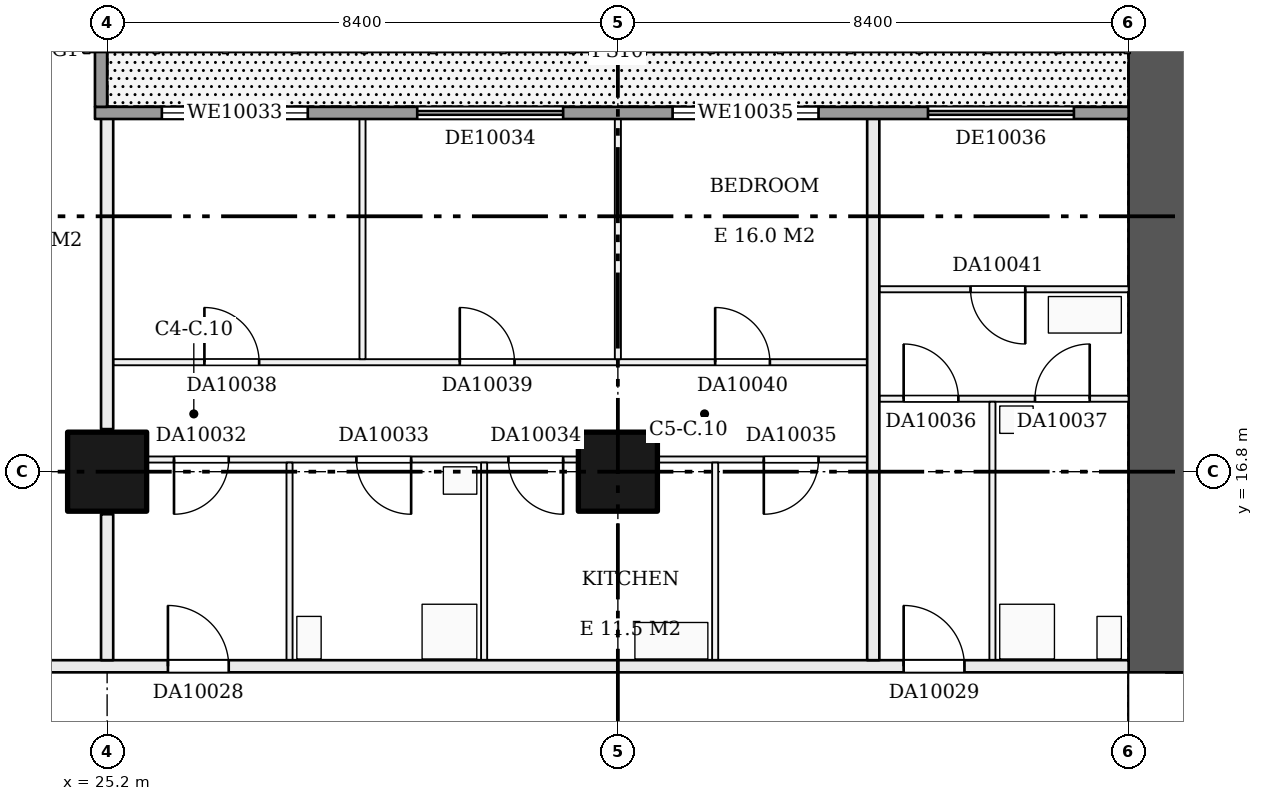
"""IFC4 building model, lengths in metres.
Left out: names, types, materials, properties, quantities, classifications, styles, units other than length and angle.
Written with IfcOpenShell. Run it as: python <this file> out.ifc"""

import sys

from ifc_helpers import new_model, si_unit, direction, frame, frame_2d, origin, origin_2d, place, context, subcontext, project, spatial, rectangle, extrude, element, fill, save


model = new_model("IFC4")
c1 = context("Model", 3, precision=1e-05, world=origin(), true_north=direction((0.0, 1.0)))
c2 = subcontext(c1, "Body", "Model", "MODEL_VIEW")
j1 = project(units=[si_unit("LENGTHUNIT", "METRE"), si_unit("PLANEANGLEUNIT", "RADIAN")], contexts=[c1])
p1 = place(None, origin())
s1 = spatial("IfcSite", under=j1, at=p1, CompositionType="ELEMENT")
p2 = place(p1, origin())
s2 = spatial("IfcBuilding", under=s1, at=p2, CompositionType="ELEMENT")
p3 = place(p2, frame((0.0, 0.0, 46.2)))
s3 = spatial("IfcBuildingStorey", under=s2, at=p3, CompositionType="ELEMENT", Elevation=46.2)
for number, where, z_axis, x_axis in (
    (1, (25.2, 16.8, 0.0), (0.0, 0.0, 1.0), (1.0, 0.0, 0.0)),
    (2, (33.6, 16.8, 0.0), (0.0, 0.0, 1.0), (1.0, 0.0, 0.0)),
):
    element("IfcColumn", number, at=place(p3, frame(where, z_axis=z_axis, x_axis=x_axis)), inside=s3, PredefinedType="COLUMN", context=c2, shape_type="SweptSolid", body=[
        extrude(rectangle(XDim=1.3, YDim=1.3, at=origin_2d()), origin(), (0.0, 0.0, 1.0), 3.22),
    ])
p4 = place(p3, frame((42.6, 9.6, 0.0), z_axis=(0.0, 0.0, 1.0), x_axis=(0.0, 1.0, 0.0)))
e3 = element("IfcWall", 3, at=p4, inside=s3, PredefinedType="SHEAR", context=c2, shape_type="SweptSolid", body=[
    extrude(rectangle(XDim=14.4, YDim=1.2, at=frame_2d((7.2, 0.0))), origin(), (0.0, 0.0, 1.0), 3.22),
])
p5 = place(p4, frame((2.1, 0.0, 0.0)))
e4 = element("IfcOpeningElement", 4, at=p5, cuts=e3, PredefinedType="OPENING", context=c2, shape_type="SweptSolid", body=[
    extrude(rectangle(XDim=1.8, YDim=2.1, at=frame_2d((0.9, 1.05))), frame((0.0, 0.61, 0.0), z_axis=(0.0, -1.0, 0.0), x_axis=(1.0, 0.0, 0.0)), (0.0, 0.0, 1.0), 1.22),
])
p6 = place(p3, frame((16.9, 13.6, 0.0), z_axis=(0.0, 0.0, 1.0), x_axis=(1.0, 0.0, 0.0)))
e5 = element("IfcWall", 5, at=p6, inside=s3, PredefinedType="PARTITIONING", context=c2, shape_type="SweptSolid", body=[
    extrude(rectangle(XDim=25.1, YDim=0.2, at=frame_2d((12.55, 0.0))), origin(), (0.0, 0.0, 1.0), 3.22),
])
p7 = place(p6, frame((9.3, 0.0, 0.0)))
e6 = element("IfcOpeningElement", 6, at=p7, cuts=e5, PredefinedType="OPENING", context=c2, shape_type="SweptSolid", body=[
    extrude(rectangle(XDim=1.0, YDim=2.1, at=frame_2d((0.5, 1.05))), frame((0.0, 0.11, 0.0), z_axis=(0.0, -1.0, 0.0), x_axis=(1.0, 0.0, 0.0)), (0.0, 0.0, 1.0), 0.22),
])
p8 = place(p6, frame((21.4, 0.0, 0.0)))
e7 = element("IfcOpeningElement", 7, at=p8, cuts=e5, PredefinedType="OPENING", context=c2, shape_type="SweptSolid", body=[
    extrude(rectangle(XDim=1.0, YDim=2.1, at=frame_2d((0.5, 1.05))), frame((0.0, 0.11, 0.0), z_axis=(0.0, -1.0, 0.0), x_axis=(1.0, 0.0, 0.0)), (0.0, 0.0, 1.0), 0.22),
])
p9 = place(p6, frame((5.2, 0.0, 0.0)))
e8 = element("IfcOpeningElement", 8, at=p9, cuts=e5, PredefinedType="OPENING", context=c2, shape_type="SweptSolid", body=[
    extrude(rectangle(XDim=1.0, YDim=2.1, at=frame_2d((0.5, 1.05))), frame((0.0, 0.11, 0.0), z_axis=(0.0, -1.0, 0.0), x_axis=(1.0, 0.0, 0.0)), (0.0, 0.0, 1.0), 0.22),
])
p10 = place(p3, frame((25.3, 17.0, 0.0), z_axis=(0.0, 0.0, 1.0), x_axis=(1.0, 0.0, 0.0)))
e9 = element("IfcWall", 9, at=p10, inside=s3, PredefinedType="PARTITIONING", context=c2, shape_type="SweptSolid", body=[
    extrude(rectangle(XDim=12.4, YDim=0.1, at=frame_2d((6.2, 0.0))), origin(), (0.0, 0.0, 1.0), 3.22),
])
p11 = place(p10, frame((1.0, 0.0, 0.0)))
e10 = element("IfcOpeningElement", 10, at=p11, cuts=e9, PredefinedType="OPENING", context=c2, shape_type="SweptSolid", body=[
    extrude(rectangle(XDim=0.9, YDim=2.1, at=frame_2d((0.45, 1.05))), frame((0.0, 0.06, 0.0), z_axis=(0.0, -1.0, 0.0), x_axis=(1.0, 0.0, 0.0)), (0.0, 0.0, 1.0), 0.12),
])
p12 = place(p10, frame((4.0, 0.0, 0.0)))
e11 = element("IfcOpeningElement", 11, at=p12, cuts=e9, PredefinedType="OPENING", context=c2, shape_type="SweptSolid", body=[
    extrude(rectangle(XDim=0.9, YDim=2.1, at=frame_2d((0.45, 1.05))), frame((0.0, 0.06, 0.0), z_axis=(0.0, -1.0, 0.0), x_axis=(1.0, 0.0, 0.0)), (0.0, 0.0, 1.0), 0.12),
])
p13 = place(p10, frame((6.5, 0.0, 0.0)))
e12 = element("IfcOpeningElement", 12, at=p13, cuts=e9, PredefinedType="OPENING", context=c2, shape_type="SweptSolid", body=[
    extrude(rectangle(XDim=0.9, YDim=2.1, at=frame_2d((0.45, 1.05))), frame((0.0, 0.06, 0.0), z_axis=(0.0, -1.0, 0.0), x_axis=(1.0, 0.0, 0.0)), (0.0, 0.0, 1.0), 0.12),
])
p14 = place(p10, frame((10.7, 0.0, 0.0)))
e13 = element("IfcOpeningElement", 13, at=p14, cuts=e9, PredefinedType="OPENING", context=c2, shape_type="SweptSolid", body=[
    extrude(rectangle(XDim=0.9, YDim=2.1, at=frame_2d((0.45, 1.05))), frame((0.0, 0.06, 0.0), z_axis=(0.0, -1.0, 0.0), x_axis=(1.0, 0.0, 0.0)), (0.0, 0.0, 1.0), 0.12),
])
p15 = place(p3, frame((37.9, 18.0, 0.0), z_axis=(0.0, 0.0, 1.0), x_axis=(1.0, 0.0, 0.0)))
e14 = element("IfcWall", 14, at=p15, inside=s3, PredefinedType="PARTITIONING", context=c2, shape_type="SweptSolid", body=[
    extrude(rectangle(XDim=4.1, YDim=0.1, at=frame_2d((2.05, 0.0))), origin(), (0.0, 0.0, 1.0), 3.22),
])
p16 = place(p15, frame((0.4, 0.0, 0.0)))
e15 = element("IfcOpeningElement", 15, at=p16, cuts=e14, PredefinedType="OPENING", context=c2, shape_type="SweptSolid", body=[
    extrude(rectangle(XDim=0.9, YDim=2.1, at=frame_2d((0.45, 1.05))), frame((0.0, 0.06, 0.0), z_axis=(0.0, -1.0, 0.0), x_axis=(1.0, 0.0, 0.0)), (0.0, 0.0, 1.0), 0.12),
])
p17 = place(p15, frame((2.56, 0.0, 0.0)))
e16 = element("IfcOpeningElement", 16, at=p17, cuts=e14, PredefinedType="OPENING", context=c2, shape_type="SweptSolid", body=[
    extrude(rectangle(XDim=0.9, YDim=2.1, at=frame_2d((0.45, 1.05))), frame((0.0, 0.06, 0.0), z_axis=(0.0, -1.0, 0.0), x_axis=(1.0, 0.0, 0.0)), (0.0, 0.0, 1.0), 0.12),
])
p18 = place(p3, frame((25.3, 18.6, 0.0), z_axis=(0.0, 0.0, 1.0), x_axis=(1.0, 0.0, 0.0)))
e17 = element("IfcWall", 17, at=p18, inside=s3, PredefinedType="PARTITIONING", context=c2, shape_type="SweptSolid", body=[
    extrude(rectangle(XDim=12.4, YDim=0.1, at=frame_2d((6.2, 0.0))), origin(), (0.0, 0.0, 1.0), 3.22),
])
p19 = place(p18, frame((1.5, 0.0, 0.0)))
e18 = element("IfcOpeningElement", 18, at=p19, cuts=e17, PredefinedType="OPENING", context=c2, shape_type="SweptSolid", body=[
    extrude(rectangle(XDim=0.9, YDim=2.1, at=frame_2d((0.45, 1.05))), frame((0.0, 0.06, 0.0), z_axis=(0.0, -1.0, 0.0), x_axis=(1.0, 0.0, 0.0)), (0.0, 0.0, 1.0), 0.12),
])
p20 = place(p18, frame((5.7, 0.0, 0.0)))
e19 = element("IfcOpeningElement", 19, at=p20, cuts=e17, PredefinedType="OPENING", context=c2, shape_type="SweptSolid", body=[
    extrude(rectangle(XDim=0.9, YDim=2.1, at=frame_2d((0.45, 1.05))), frame((0.0, 0.06, 0.0), z_axis=(0.0, -1.0, 0.0), x_axis=(1.0, 0.0, 0.0)), (0.0, 0.0, 1.0), 0.12),
])
p21 = place(p18, frame((9.9, 0.0, 0.0)))
e20 = element("IfcOpeningElement", 20, at=p21, cuts=e17, PredefinedType="OPENING", context=c2, shape_type="SweptSolid", body=[
    extrude(rectangle(XDim=0.9, YDim=2.1, at=frame_2d((0.45, 1.05))), frame((0.0, 0.06, 0.0), z_axis=(0.0, -1.0, 0.0), x_axis=(1.0, 0.0, 0.0)), (0.0, 0.0, 1.0), 0.12),
])
p22 = place(p3, frame((37.9, 19.8, 0.0), z_axis=(0.0, 0.0, 1.0), x_axis=(1.0, 0.0, 0.0)))
e21 = element("IfcWall", 21, at=p22, inside=s3, PredefinedType="PARTITIONING", context=c2, shape_type="SweptSolid", body=[
    extrude(rectangle(XDim=4.1, YDim=0.1, at=frame_2d((2.05, 0.0))), origin(), (0.0, 0.0, 1.0), 3.22),
])
p23 = place(p22, frame((1.5, 0.0, 0.0)))
e22 = element("IfcOpeningElement", 22, at=p23, cuts=e21, PredefinedType="OPENING", context=c2, shape_type="SweptSolid", body=[
    extrude(rectangle(XDim=0.9, YDim=2.1, at=frame_2d((0.45, 1.05))), frame((0.0, 0.06, 0.0), z_axis=(0.0, -1.0, 0.0), x_axis=(1.0, 0.0, 0.0)), (0.0, 0.0, 1.0), 0.12),
])
p24 = place(p3, frame((25.2, 13.7, 0.0), z_axis=(0.0, 0.0, 1.0), x_axis=(0.0, 1.0, 0.0)))
e23 = element("IfcWall", 23, at=p24, inside=s3, PredefinedType="PARTITIONING", context=c2, shape_type="SweptSolid", body=[
    extrude(rectangle(XDim=2.4, YDim=0.2, at=frame_2d((1.2, 0.0))), origin(), (0.0, 0.0, 1.0), 3.22),
])
p25 = place(p3, frame((25.2, 17.5, 0.0), z_axis=(0.0, 0.0, 1.0), x_axis=(0.0, 1.0, 0.0)))
e24 = element("IfcWall", 24, at=p25, inside=s3, PredefinedType="PARTITIONING", context=c2, shape_type="SweptSolid", body=[
    extrude(rectangle(XDim=5.2, YDim=0.2, at=frame_2d((2.6, 0.0))), origin(), (0.0, 0.0, 1.0), 3.22),
])
p26 = place(p3, frame((28.2, 13.7, 0.0), z_axis=(0.0, 0.0, 1.0), x_axis=(0.0, 1.0, 0.0)))
e25 = element("IfcWall", 25, at=p26, inside=s3, PredefinedType="PARTITIONING", context=c2, shape_type="SweptSolid", body=[
    extrude(rectangle(XDim=3.25, YDim=0.1, at=frame_2d((1.625, 0.0))), origin(), (0.0, 0.0, 1.0), 3.22),
])
p27 = place(p3, frame((29.4, 18.65, 0.0), z_axis=(0.0, 0.0, 1.0), x_axis=(0.0, 1.0, 0.0)))
e26 = element("IfcWall", 26, at=p27, inside=s3, PredefinedType="PARTITIONING", context=c2, shape_type="SweptSolid", body=[
    extrude(rectangle(XDim=4.05, YDim=0.1, at=frame_2d((2.025, 0.0))), origin(), (0.0, 0.0, 1.0), 3.22),
])
p28 = place(p3, frame((31.4, 13.7, 0.0), z_axis=(0.0, 0.0, 1.0), x_axis=(0.0, 1.0, 0.0)))
e27 = element("IfcWall", 27, at=p28, inside=s3, PredefinedType="PARTITIONING", context=c2, shape_type="SweptSolid", body=[
    extrude(rectangle(XDim=3.25, YDim=0.1, at=frame_2d((1.625, 0.0))), origin(), (0.0, 0.0, 1.0), 3.22),
])
p29 = place(p3, frame((33.6, 18.65, 0.0), z_axis=(0.0, 0.0, 1.0), x_axis=(0.0, 1.0, 0.0)))
e28 = element("IfcWall", 28, at=p29, inside=s3, PredefinedType="PARTITIONING", context=c2, shape_type="SweptSolid", body=[
    extrude(rectangle(XDim=4.05, YDim=0.1, at=frame_2d((2.025, 0.0))), origin(), (0.0, 0.0, 1.0), 3.22),
])
p30 = place(p3, frame((35.2, 13.7, 0.0), z_axis=(0.0, 0.0, 1.0), x_axis=(0.0, 1.0, 0.0)))
e29 = element("IfcWall", 29, at=p30, inside=s3, PredefinedType="PARTITIONING", context=c2, shape_type="SweptSolid", body=[
    extrude(rectangle(XDim=3.25, YDim=0.1, at=frame_2d((1.625, 0.0))), origin(), (0.0, 0.0, 1.0), 3.22),
])
p31 = place(p3, frame((37.8, 13.7, 0.0), z_axis=(0.0, 0.0, 1.0), x_axis=(0.0, 1.0, 0.0)))
e30 = element("IfcWall", 30, at=p31, inside=s3, PredefinedType="PARTITIONING", context=c2, shape_type="SweptSolid", body=[
    extrude(rectangle(XDim=9.0, YDim=0.2, at=frame_2d((4.5, 0.0))), origin(), (0.0, 0.0, 1.0), 3.22),
])
p32 = place(p3, frame((39.76, 13.7, 0.0), z_axis=(0.0, 0.0, 1.0), x_axis=(0.0, 1.0, 0.0)))
e31 = element("IfcWall", 31, at=p32, inside=s3, PredefinedType="PARTITIONING", context=c2, shape_type="SweptSolid", body=[
    extrude(rectangle(XDim=4.25, YDim=0.1, at=frame_2d((2.125, 0.0))), origin(), (0.0, 0.0, 1.0), 3.22),
])
p33 = place(p3, frame((42.0, 22.7, 0.0), z_axis=(0.0, 0.0, 1.0), x_axis=(-1.0, 0.0, 0.0)))
e32 = element("IfcWall", 32, at=p33, inside=s3, PredefinedType="SOLIDWALL", context=c2, shape_type="SweptSolid", body=[
    extrude(rectangle(XDim=17.0, YDim=0.2, at=frame_2d((8.5, 0.0))), origin(), (0.0, 0.0, 1.0), 3.22),
])
p34 = place(p33, frame((13.5, 0.0, 0.9)))
e33 = element("IfcOpeningElement", 33, at=p34, cuts=e32, PredefinedType="OPENING", context=c2, shape_type="SweptSolid", body=[
    extrude(rectangle(XDim=2.4, YDim=1.5, at=frame_2d((1.2, 0.75))), frame((0.0, 0.11, 0.0), z_axis=(0.0, -1.0, 0.0), x_axis=(1.0, 0.0, 0.0)), (0.0, 0.0, 1.0), 0.22),
])
p35 = place(p33, frame((9.3, 0.0, 0.0)))
e34 = element("IfcOpeningElement", 34, at=p35, cuts=e32, PredefinedType="OPENING", context=c2, shape_type="SweptSolid", body=[
    extrude(rectangle(XDim=2.4, YDim=2.2, at=frame_2d((1.2, 1.1))), frame((0.0, 0.11, 0.0), z_axis=(0.0, -1.0, 0.0), x_axis=(1.0, 0.0, 0.0)), (0.0, 0.0, 1.0), 0.22),
])
p36 = place(p33, frame((5.1, 0.0, 0.9)))
e35 = element("IfcOpeningElement", 35, at=p36, cuts=e32, PredefinedType="OPENING", context=c2, shape_type="SweptSolid", body=[
    extrude(rectangle(XDim=2.4, YDim=1.5, at=frame_2d((1.2, 0.75))), frame((0.0, 0.11, 0.0), z_axis=(0.0, -1.0, 0.0), x_axis=(1.0, 0.0, 0.0)), (0.0, 0.0, 1.0), 0.22),
])
p37 = place(p33, frame((0.9, 0.0, 0.0)))
e36 = element("IfcOpeningElement", 36, at=p37, cuts=e32, PredefinedType="OPENING", context=c2, shape_type="SweptSolid", body=[
    extrude(rectangle(XDim=2.4, YDim=2.2, at=frame_2d((1.2, 1.1))), frame((0.0, 0.11, 0.0), z_axis=(0.0, -1.0, 0.0), x_axis=(1.0, 0.0, 0.0)), (0.0, 0.0, 1.0), 0.22),
])
p38 = place(p3, frame((25.1, 22.8, 0.0), z_axis=(0.0, 0.0, 1.0), x_axis=(0.0, 1.0, 0.0)))
e37 = element("IfcWall", 37, at=p38, inside=s3, PredefinedType="SOLIDWALL", context=c2, shape_type="SweptSolid", body=[
    extrude(rectangle(XDim=1.7, YDim=0.2, at=frame_2d((0.85, 0.0))), origin(), (0.0, 0.0, 1.0), 3.22),
])
p39 = place(p5, frame((1.8, 0.0, 0.0), z_axis=(0.0, 0.0, 1.0), x_axis=(-1.0, 0.0, 0.0)))
e38 = element("IfcDoor", 38, at=p39, inside=s3, OperationType="DOUBLE_DOOR_SINGLE_SWING", PredefinedType="DOOR", context=c2, shape_type="SweptSolid", body=[
    extrude(rectangle(XDim=1.8, YDim=2.1, at=frame_2d((0.9, 1.05))), frame((0.0, 0.025, 0.0), z_axis=(0.0, -1.0, 0.0), x_axis=(1.0, 0.0, 0.0)), (0.0, 0.0, 1.0), 0.05),
])
fill(e4, e38)
p40 = place(p7, origin())
e39 = element("IfcDoor", 39, at=p40, inside=s3, OperationType="SINGLE_SWING_LEFT", PredefinedType="DOOR", context=c2, shape_type="SweptSolid", body=[
    extrude(rectangle(XDim=1.0, YDim=2.1, at=frame_2d((0.5, 1.05))), frame((0.0, 0.025, 0.0), z_axis=(0.0, -1.0, 0.0), x_axis=(1.0, 0.0, 0.0)), (0.0, 0.0, 1.0), 0.05),
])
fill(e6, e39)
p41 = place(p8, origin())
e40 = element("IfcDoor", 40, at=p41, inside=s3, OperationType="SINGLE_SWING_LEFT", PredefinedType="DOOR", context=c2, shape_type="SweptSolid", body=[
    extrude(rectangle(XDim=1.0, YDim=2.1, at=frame_2d((0.5, 1.05))), frame((0.0, 0.025, 0.0), z_axis=(0.0, -1.0, 0.0), x_axis=(1.0, 0.0, 0.0)), (0.0, 0.0, 1.0), 0.05),
])
fill(e7, e40)
p42 = place(p11, frame((0.9, 0.0, 0.0), z_axis=(0.0, 0.0, 1.0), x_axis=(-1.0, 0.0, 0.0)))
e41 = element("IfcDoor", 41, at=p42, inside=s3, OperationType="SINGLE_SWING_RIGHT", PredefinedType="DOOR", context=c2, shape_type="SweptSolid", body=[
    extrude(rectangle(XDim=0.9, YDim=2.1, at=frame_2d((0.45, 1.05))), frame((0.0, 0.025, 0.0), z_axis=(0.0, -1.0, 0.0), x_axis=(1.0, 0.0, 0.0)), (0.0, 0.0, 1.0), 0.05),
])
fill(e10, e41)
p43 = place(p12, frame((0.9, 0.0, 0.0), z_axis=(0.0, 0.0, 1.0), x_axis=(-1.0, 0.0, 0.0)))
e42 = element("IfcDoor", 42, at=p43, inside=s3, OperationType="SINGLE_SWING_LEFT", PredefinedType="DOOR", context=c2, shape_type="SweptSolid", body=[
    extrude(rectangle(XDim=0.9, YDim=2.1, at=frame_2d((0.45, 1.05))), frame((0.0, 0.025, 0.0), z_axis=(0.0, -1.0, 0.0), x_axis=(1.0, 0.0, 0.0)), (0.0, 0.0, 1.0), 0.05),
])
fill(e11, e42)
p44 = place(p13, frame((0.9, 0.0, 0.0), z_axis=(0.0, 0.0, 1.0), x_axis=(-1.0, 0.0, 0.0)))
e43 = element("IfcDoor", 43, at=p44, inside=s3, OperationType="SINGLE_SWING_LEFT", PredefinedType="DOOR", context=c2, shape_type="SweptSolid", body=[
    extrude(rectangle(XDim=0.9, YDim=2.1, at=frame_2d((0.45, 1.05))), frame((0.0, 0.025, 0.0), z_axis=(0.0, -1.0, 0.0), x_axis=(1.0, 0.0, 0.0)), (0.0, 0.0, 1.0), 0.05),
])
fill(e12, e43)
p45 = place(p14, frame((0.9, 0.0, 0.0), z_axis=(0.0, 0.0, 1.0), x_axis=(-1.0, 0.0, 0.0)))
e44 = element("IfcDoor", 44, at=p45, inside=s3, OperationType="SINGLE_SWING_RIGHT", PredefinedType="DOOR", context=c2, shape_type="SweptSolid", body=[
    extrude(rectangle(XDim=0.9, YDim=2.1, at=frame_2d((0.45, 1.05))), frame((0.0, 0.025, 0.0), z_axis=(0.0, -1.0, 0.0), x_axis=(1.0, 0.0, 0.0)), (0.0, 0.0, 1.0), 0.05),
])
fill(e13, e44)
p46 = place(p16, origin())
e45 = element("IfcDoor", 45, at=p46, inside=s3, OperationType="SINGLE_SWING_LEFT", PredefinedType="DOOR", context=c2, shape_type="SweptSolid", body=[
    extrude(rectangle(XDim=0.9, YDim=2.1, at=frame_2d((0.45, 1.05))), frame((0.0, 0.025, 0.0), z_axis=(0.0, -1.0, 0.0), x_axis=(1.0, 0.0, 0.0)), (0.0, 0.0, 1.0), 0.05),
])
fill(e15, e45)
p47 = place(p17, origin())
e46 = element("IfcDoor", 46, at=p47, inside=s3, OperationType="SINGLE_SWING_RIGHT", PredefinedType="DOOR", context=c2, shape_type="SweptSolid", body=[
    extrude(rectangle(XDim=0.9, YDim=2.1, at=frame_2d((0.45, 1.05))), frame((0.0, 0.025, 0.0), z_axis=(0.0, -1.0, 0.0), x_axis=(1.0, 0.0, 0.0)), (0.0, 0.0, 1.0), 0.05),
])
fill(e16, e46)
p48 = place(p19, origin())
e47 = element("IfcDoor", 47, at=p48, inside=s3, OperationType="SINGLE_SWING_LEFT", PredefinedType="DOOR", context=c2, shape_type="SweptSolid", body=[
    extrude(rectangle(XDim=0.9, YDim=2.1, at=frame_2d((0.45, 1.05))), frame((0.0, 0.025, 0.0), z_axis=(0.0, -1.0, 0.0), x_axis=(1.0, 0.0, 0.0)), (0.0, 0.0, 1.0), 0.05),
])
fill(e18, e47)
p49 = place(p20, origin())
e48 = element("IfcDoor", 48, at=p49, inside=s3, OperationType="SINGLE_SWING_LEFT", PredefinedType="DOOR", context=c2, shape_type="SweptSolid", body=[
    extrude(rectangle(XDim=0.9, YDim=2.1, at=frame_2d((0.45, 1.05))), frame((0.0, 0.025, 0.0), z_axis=(0.0, -1.0, 0.0), x_axis=(1.0, 0.0, 0.0)), (0.0, 0.0, 1.0), 0.05),
])
fill(e19, e48)
p50 = place(p21, origin())
e49 = element("IfcDoor", 49, at=p50, inside=s3, OperationType="SINGLE_SWING_LEFT", PredefinedType="DOOR", context=c2, shape_type="SweptSolid", body=[
    extrude(rectangle(XDim=0.9, YDim=2.1, at=frame_2d((0.45, 1.05))), frame((0.0, 0.025, 0.0), z_axis=(0.0, -1.0, 0.0), x_axis=(1.0, 0.0, 0.0)), (0.0, 0.0, 1.0), 0.05),
])
fill(e20, e49)
p51 = place(p23, frame((0.9, 0.0, 0.0), z_axis=(0.0, 0.0, 1.0), x_axis=(-1.0, 0.0, 0.0)))
e50 = element("IfcDoor", 50, at=p51, inside=s3, OperationType="SINGLE_SWING_LEFT", PredefinedType="DOOR", context=c2, shape_type="SweptSolid", body=[
    extrude(rectangle(XDim=0.9, YDim=2.1, at=frame_2d((0.45, 1.05))), frame((0.0, 0.025, 0.0), z_axis=(0.0, -1.0, 0.0), x_axis=(1.0, 0.0, 0.0)), (0.0, 0.0, 1.0), 0.05),
])
fill(e22, e50)
p52 = place(p34, origin())
e51 = element("IfcWindow", 51, at=p52, inside=s3, PartitioningType="SINGLE_PANEL", PredefinedType="WINDOW", context=c2, shape_type="SweptSolid", body=[
    extrude(rectangle(XDim=2.4, YDim=1.5, at=frame_2d((1.2, 0.75))), frame((0.0, 0.03, 0.0), z_axis=(0.0, -1.0, 0.0), x_axis=(1.0, 0.0, 0.0)), (0.0, 0.0, 1.0), 0.06),
])
fill(e33, e51)
p53 = place(p35, origin())
e52 = element("IfcDoor", 52, at=p53, inside=s3, OperationType="DOUBLE_DOOR_SLIDING", PredefinedType="DOOR", context=c2, shape_type="SweptSolid", body=[
    extrude(rectangle(XDim=2.4, YDim=2.2, at=frame_2d((1.2, 1.1))), frame((0.0, 0.025, 0.0), z_axis=(0.0, -1.0, 0.0), x_axis=(1.0, 0.0, 0.0)), (0.0, 0.0, 1.0), 0.05),
])
fill(e34, e52)
p54 = place(p36, origin())
e53 = element("IfcWindow", 53, at=p54, inside=s3, PartitioningType="SINGLE_PANEL", PredefinedType="WINDOW", context=c2, shape_type="SweptSolid", body=[
    extrude(rectangle(XDim=2.4, YDim=1.5, at=frame_2d((1.2, 0.75))), frame((0.0, 0.03, 0.0), z_axis=(0.0, -1.0, 0.0), x_axis=(1.0, 0.0, 0.0)), (0.0, 0.0, 1.0), 0.06),
])
fill(e35, e53)
p55 = place(p37, origin())
e54 = element("IfcDoor", 54, at=p55, inside=s3, OperationType="DOUBLE_DOOR_SLIDING", PredefinedType="DOOR", context=c2, shape_type="SweptSolid", body=[
    extrude(rectangle(XDim=2.4, YDim=2.2, at=frame_2d((1.2, 1.1))), frame((0.0, 0.025, 0.0), z_axis=(0.0, -1.0, 0.0), x_axis=(1.0, 0.0, 0.0)), (0.0, 0.0, 1.0), 0.05),
])
fill(e36, e54)
save(model, sys.argv[1])
